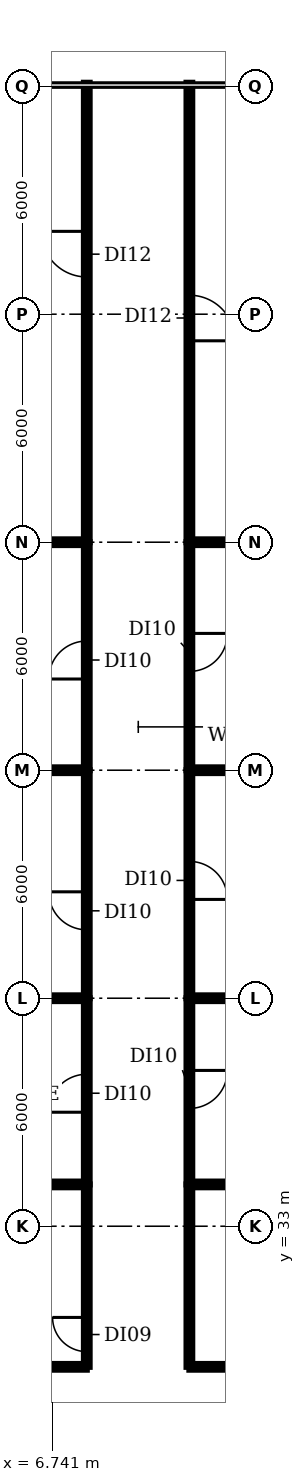
"""IFC4 building model, lengths in metres.
Left out: names, types, materials, properties, quantities, classifications, styles, units other than length and angle.
Written with IfcOpenShell. Run it as: python <this file> out.ifc"""

import sys

from ifc_helpers import new_model, si_unit, direction, frame, frame_2d, origin, place, context, subcontext, project, spatial, rectangle, extrude, element, fill, save


model = new_model("IFC4")
c1 = context("Model", 3, precision=1e-05, world=origin(), true_north=direction((0.0, 1.0)))
c2 = subcontext(c1, "Body", "Model", "MODEL_VIEW")
j1 = project(units=[si_unit("LENGTHUNIT", "METRE"), si_unit("PLANEANGLEUNIT", "RADIAN")], contexts=[c1])
p1 = place(None, origin())
s1 = spatial("IfcSite", under=j1, at=p1, CompositionType="ELEMENT")
p2 = place(p1, origin())
s2 = spatial("IfcBuilding", under=s1, at=p2, CompositionType="ELEMENT")
p3 = place(p2, frame((0.0, 0.0, 167.6)))
s3 = spatial("IfcBuildingStorey", under=s2, at=p3, CompositionType="ELEMENT", Elevation=167.6)
for number, where, z_axis, x_axis in (
    (1, (-0.98, 34.1, 0.0), (0.0, 0.0, 1.0), (1.0, 0.0, 0.0)),
    (2, (-0.98, 39.0, 0.0), (0.0, 0.0, 1.0), (1.0, 0.0, 0.0)),
    (3, (-0.98, 45.0, 0.0), (0.0, 0.0, 1.0), (1.0, 0.0, 0.0)),
):
    element("IfcWall", number, at=place(p3, frame(where, z_axis=z_axis, x_axis=x_axis)), inside=s3, PredefinedType="PARTITIONING", context=c2, shape_type="SweptSolid", body=[
        extrude(rectangle(XDim=8.63, YDim=0.15, at=frame_2d((4.315, 0.0))), origin(), (0.0, 0.0, 1.0), 2.88),
    ])
p4 = place(p3, frame((-0.965, 51.0, 0.0), z_axis=(0.0, 0.0, 1.0), x_axis=(1.0, 0.0, 0.0)))
e4 = element("IfcWall", 4, at=p4, inside=s3, PredefinedType="PARTITIONING", context=c2, shape_type="SweptSolid", body=[
    extrude(rectangle(XDim=8.615, YDim=0.15, at=frame_2d((4.308, 0.0))), origin(), (0.0, 0.0, 1.0), 2.88),
])
p5 = place(p3, frame((2.7, 29.3, 0.0), z_axis=(0.0, 0.0, 1.0), x_axis=(1.0, 0.0, 0.0)))
e5 = element("IfcWall", 5, at=p5, inside=s3, PredefinedType="PARTITIONING", context=c2, shape_type="SweptSolid", body=[
    extrude(rectangle(XDim=4.95, YDim=0.15, at=frame_2d((2.475, 0.0))), origin(), (0.0, 0.0, 1.0), 2.88),
])
p6 = place(p3, frame((7.65, 29.3, 0.0), z_axis=(0.0, 0.0, 1.0), x_axis=(0.0, 1.0, 0.0)))
e6 = element("IfcWall", 6, at=p6, inside=s3, PredefinedType="PARTITIONING", context=c2, shape_type="SweptSolid", body=[
    extrude(rectangle(XDim=4.8, YDim=0.15, at=frame_2d((2.4, 0.0))), origin(), (0.0, 0.0, 1.0), 2.88),
])
p7 = place(p6, frame((0.4, 0.0, 0.0)))
e7 = element("IfcOpeningElement", 7, at=p7, cuts=e6, PredefinedType="OPENING", context=c2, shape_type="SweptSolid", body=[
    extrude(rectangle(XDim=0.9, YDim=2.1, at=frame_2d((0.45, 1.05))), frame((0.0, 0.085, 0.0), z_axis=(0.0, -1.0, 0.0), x_axis=(1.0, 0.0, 0.0)), (0.0, 0.0, 1.0), 0.17),
])
p8 = place(p3, frame((7.65, 34.1, 0.0), z_axis=(0.0, 0.0, 1.0), x_axis=(0.0, 1.0, 0.0)))
e8 = element("IfcWall", 8, at=p8, inside=s3, PredefinedType="PARTITIONING", context=c2, shape_type="SweptSolid", body=[
    extrude(rectangle(XDim=4.9, YDim=0.15, at=frame_2d((2.45, 0.0))), origin(), (0.0, 0.0, 1.0), 2.88),
])
p9 = place(p8, frame((1.9, 0.0, 0.0)))
e9 = element("IfcOpeningElement", 9, at=p9, cuts=e8, PredefinedType="OPENING", context=c2, shape_type="SweptSolid", body=[
    extrude(rectangle(XDim=1.0, YDim=2.1, at=frame_2d((0.5, 1.05))), frame((0.0, 0.085, 0.0), z_axis=(0.0, -1.0, 0.0), x_axis=(1.0, 0.0, 0.0)), (0.0, 0.0, 1.0), 0.17),
])
p10 = place(p3, frame((7.65, 39.0, 0.0), z_axis=(0.0, 0.0, 1.0), x_axis=(0.0, 1.0, 0.0)))
e10 = element("IfcWall", 10, at=p10, inside=s3, PredefinedType="PARTITIONING", context=c2, shape_type="SweptSolid", body=[
    extrude(rectangle(XDim=6.0, YDim=0.15, at=frame_2d((3.0, 0.0))), origin(), (0.0, 0.0, 1.0), 2.88),
])
p11 = place(p10, frame((1.8, 0.0, 0.0)))
e11 = element("IfcOpeningElement", 11, at=p11, cuts=e10, PredefinedType="OPENING", context=c2, shape_type="SweptSolid", body=[
    extrude(rectangle(XDim=1.0, YDim=2.1, at=frame_2d((0.5, 1.05))), frame((0.0, 0.085, 0.0), z_axis=(0.0, -1.0, 0.0), x_axis=(1.0, 0.0, 0.0)), (0.0, 0.0, 1.0), 0.17),
])
p12 = place(p3, frame((7.65, 45.0, 0.0), z_axis=(0.0, 0.0, 1.0), x_axis=(0.0, 1.0, 0.0)))
e12 = element("IfcWall", 12, at=p12, inside=s3, PredefinedType="PARTITIONING", context=c2, shape_type="SweptSolid", body=[
    extrude(rectangle(XDim=6.0, YDim=0.15, at=frame_2d((3.0, 0.0))), origin(), (0.0, 0.0, 1.0), 2.88),
])
p13 = place(p12, frame((2.4, 0.0, 0.0)))
e13 = element("IfcOpeningElement", 13, at=p13, cuts=e12, PredefinedType="OPENING", context=c2, shape_type="SweptSolid", body=[
    extrude(rectangle(XDim=1.0, YDim=2.1, at=frame_2d((0.5, 1.05))), frame((0.0, 0.085, 0.0), z_axis=(0.0, -1.0, 0.0), x_axis=(1.0, 0.0, 0.0)), (0.0, 0.0, 1.0), 0.17),
])
p14 = place(p3, frame((7.65, 51.0, 0.0), z_axis=(0.0, 0.0, 1.0), x_axis=(0.0, 1.0, 0.0)))
e14 = element("IfcWall", 14, at=p14, inside=s3, PredefinedType="PARTITIONING", context=c2, shape_type="SweptSolid", body=[
    extrude(rectangle(XDim=12.09, YDim=0.15, at=frame_2d((6.045, 0.0))), origin(), (0.0, 0.0, 1.0), 2.88),
])
p15 = place(p14, frame((6.98, 0.0, 0.0)))
e15 = element("IfcOpeningElement", 15, at=p15, cuts=e14, PredefinedType="OPENING", context=c2, shape_type="SweptSolid", body=[
    extrude(rectangle(XDim=1.2, YDim=2.1, at=frame_2d((0.6, 1.05))), frame((0.0, 0.085, 0.0), z_axis=(0.0, -1.0, 0.0), x_axis=(1.0, 0.0, 0.0)), (0.0, 0.0, 1.0), 0.17),
])
p16 = place(p3, frame((10.35, 29.3, 0.0), z_axis=(0.0, 0.0, 1.0), x_axis=(0.0, 1.0, 0.0)))
e16 = element("IfcWall", 16, at=p16, inside=s3, PredefinedType="PARTITIONING", context=c2, shape_type="SweptSolid", body=[
    extrude(rectangle(XDim=4.8, YDim=0.15, at=frame_2d((2.4, 0.0))), origin(), (0.0, 0.0, 1.0), 2.88),
])
p17 = place(p3, frame((10.35, 29.3, 0.0), z_axis=(0.0, 0.0, 1.0), x_axis=(1.0, 0.0, 0.0)))
e17 = element("IfcWall", 17, at=p17, inside=s3, PredefinedType="PARTITIONING", context=c2, shape_type="SweptSolid", body=[
    extrude(rectangle(XDim=4.05, YDim=0.15, at=frame_2d((2.025, 0.0))), origin(), (0.0, 0.0, 1.0), 2.88),
])
p18 = place(p3, frame((10.35, 34.1, 0.0), z_axis=(0.0, 0.0, 1.0), x_axis=(1.0, 0.0, 0.0)))
e18 = element("IfcWall", 18, at=p18, inside=s3, PredefinedType="PARTITIONING", context=c2, shape_type="SweptSolid", body=[
    extrude(rectangle(XDim=11.1, YDim=0.15, at=frame_2d((5.55, 0.0))), origin(), (0.0, 0.0, 1.0), 2.88),
])
p19 = place(p3, frame((10.35, 39.0, 0.0), z_axis=(0.0, 0.0, 1.0), x_axis=(0.0, -1.0, 0.0)))
e19 = element("IfcWall", 19, at=p19, inside=s3, PredefinedType="PARTITIONING", context=c2, shape_type="SweptSolid", body=[
    extrude(rectangle(XDim=4.9, YDim=0.15, at=frame_2d((2.45, 0.0))), origin(), (0.0, 0.0, 1.0), 2.88),
])
p20 = place(p19, frame((1.9, 0.0, 0.0)))
e20 = element("IfcOpeningElement", 20, at=p20, cuts=e19, PredefinedType="OPENING", context=c2, shape_type="SweptSolid", body=[
    extrude(rectangle(XDim=1.0, YDim=2.1, at=frame_2d((0.5, 1.05))), frame((0.0, 0.085, 0.0), z_axis=(0.0, -1.0, 0.0), x_axis=(1.0, 0.0, 0.0)), (0.0, 0.0, 1.0), 0.17),
])
p21 = place(p3, frame((10.35, 39.0, 0.0), z_axis=(0.0, 0.0, 1.0), x_axis=(1.0, 0.0, 0.0)))
e21 = element("IfcWall", 21, at=p21, inside=s3, PredefinedType="PARTITIONING", context=c2, shape_type="SweptSolid", body=[
    extrude(rectangle(XDim=14.74, YDim=0.15, at=frame_2d((7.37, 0.0))), origin(), (0.0, 0.0, 1.0), 2.88),
])
p22 = place(p3, frame((10.35, 45.0, 0.0), z_axis=(0.0, 0.0, 1.0), x_axis=(0.0, -1.0, 0.0)))
e22 = element("IfcWall", 22, at=p22, inside=s3, PredefinedType="PARTITIONING", context=c2, shape_type="SweptSolid", body=[
    extrude(rectangle(XDim=6.0, YDim=0.15, at=frame_2d((3.0, 0.0))), origin(), (0.0, 0.0, 1.0), 2.88),
])
p23 = place(p22, frame((2.4, 0.0, 0.0)))
e23 = element("IfcOpeningElement", 23, at=p23, cuts=e22, PredefinedType="OPENING", context=c2, shape_type="SweptSolid", body=[
    extrude(rectangle(XDim=1.0, YDim=2.1, at=frame_2d((0.5, 1.05))), frame((0.0, 0.085, 0.0), z_axis=(0.0, -1.0, 0.0), x_axis=(1.0, 0.0, 0.0)), (0.0, 0.0, 1.0), 0.17),
])
p24 = place(p3, frame((10.35, 45.0, 0.0), z_axis=(0.0, 0.0, 1.0), x_axis=(1.0, 0.0, 0.0)))
e24 = element("IfcWall", 24, at=p24, inside=s3, PredefinedType="PARTITIONING", context=c2, shape_type="SweptSolid", body=[
    extrude(rectangle(XDim=14.79, YDim=0.15, at=frame_2d((7.395, 0.0))), origin(), (0.0, 0.0, 1.0), 2.88),
])
p25 = place(p3, frame((10.35, 51.0, 0.0), z_axis=(0.0, 0.0, 1.0), x_axis=(0.0, -1.0, 0.0)))
e25 = element("IfcWall", 25, at=p25, inside=s3, PredefinedType="PARTITIONING", context=c2, shape_type="SweptSolid", body=[
    extrude(rectangle(XDim=6.0, YDim=0.15, at=frame_2d((3.0, 0.0))), origin(), (0.0, 0.0, 1.0), 2.88),
])
p26 = place(p25, frame((2.4, 0.0, 0.0)))
e26 = element("IfcOpeningElement", 26, at=p26, cuts=e25, PredefinedType="OPENING", context=c2, shape_type="SweptSolid", body=[
    extrude(rectangle(XDim=1.0, YDim=2.1, at=frame_2d((0.5, 1.05))), frame((0.0, 0.085, 0.0), z_axis=(0.0, -1.0, 0.0), x_axis=(1.0, 0.0, 0.0)), (0.0, 0.0, 1.0), 0.17),
])
p27 = place(p3, frame((10.35, 51.0, 0.0), z_axis=(0.0, 0.0, 1.0), x_axis=(1.0, 0.0, 0.0)))
e27 = element("IfcWall", 27, at=p27, inside=s3, PredefinedType="PARTITIONING", context=c2, shape_type="SweptSolid", body=[
    extrude(rectangle(XDim=14.84, YDim=0.15, at=frame_2d((7.42, 0.0))), origin(), (0.0, 0.0, 1.0), 2.88),
])
p28 = place(p3, frame((10.35, 63.09, 0.0), z_axis=(0.0, 0.0, 1.0), x_axis=(0.0, -1.0, 0.0)))
e28 = element("IfcWall", 28, at=p28, inside=s3, PredefinedType="PARTITIONING", context=c2, shape_type="SweptSolid", body=[
    extrude(rectangle(XDim=12.09, YDim=0.15, at=frame_2d((6.045, 0.0))), origin(), (0.0, 0.0, 1.0), 2.88),
])
p29 = place(p28, frame((5.59, 0.0, 0.0)))
e29 = element("IfcOpeningElement", 29, at=p29, cuts=e28, PredefinedType="OPENING", context=c2, shape_type="SweptSolid", body=[
    extrude(rectangle(XDim=1.2, YDim=2.1, at=frame_2d((0.6, 1.05))), frame((0.0, 0.085, 0.0), z_axis=(0.0, -1.0, 0.0), x_axis=(1.0, 0.0, 0.0)), (0.0, 0.0, 1.0), 0.17),
])
p30 = place(p7, origin())
e30 = element("IfcDoor", 30, at=p30, inside=s3, OperationType="SINGLE_SWING_RIGHT", PredefinedType="DOOR", context=c2, shape_type="SweptSolid", body=[
    extrude(rectangle(XDim=0.9, YDim=2.1, at=frame_2d((0.45, 1.05))), frame((0.0, 0.025, 0.0), z_axis=(0.0, -1.0, 0.0), x_axis=(1.0, 0.0, 0.0)), (0.0, 0.0, 1.0), 0.05),
])
fill(e7, e30)
p31 = place(p9, origin())
e31 = element("IfcDoor", 31, at=p31, inside=s3, OperationType="SINGLE_SWING_LEFT", PredefinedType="DOOR", context=c2, shape_type="SweptSolid", body=[
    extrude(rectangle(XDim=1.0, YDim=2.1, at=frame_2d((0.5, 1.05))), frame((0.0, 0.025, 0.0), z_axis=(0.0, -1.0, 0.0), x_axis=(1.0, 0.0, 0.0)), (0.0, 0.0, 1.0), 0.05),
])
fill(e9, e31)
p32 = place(p11, origin())
e32 = element("IfcDoor", 32, at=p32, inside=s3, OperationType="SINGLE_SWING_RIGHT", PredefinedType="DOOR", context=c2, shape_type="SweptSolid", body=[
    extrude(rectangle(XDim=1.0, YDim=2.1, at=frame_2d((0.5, 1.05))), frame((0.0, 0.025, 0.0), z_axis=(0.0, -1.0, 0.0), x_axis=(1.0, 0.0, 0.0)), (0.0, 0.0, 1.0), 0.05),
])
fill(e11, e32)
p33 = place(p13, origin())
e33 = element("IfcDoor", 33, at=p33, inside=s3, OperationType="SINGLE_SWING_LEFT", PredefinedType="DOOR", context=c2, shape_type="SweptSolid", body=[
    extrude(rectangle(XDim=1.0, YDim=2.1, at=frame_2d((0.5, 1.05))), frame((0.0, 0.025, 0.0), z_axis=(0.0, -1.0, 0.0), x_axis=(1.0, 0.0, 0.0)), (0.0, 0.0, 1.0), 0.05),
])
fill(e13, e33)
p34 = place(p15, origin())
e34 = element("IfcDoor", 34, at=p34, inside=s3, OperationType="SINGLE_SWING_RIGHT", PredefinedType="DOOR", context=c2, shape_type="SweptSolid", body=[
    extrude(rectangle(XDim=1.2, YDim=2.1, at=frame_2d((0.6, 1.05))), frame((0.0, 0.025, 0.0), z_axis=(0.0, -1.0, 0.0), x_axis=(1.0, 0.0, 0.0)), (0.0, 0.0, 1.0), 0.05),
])
fill(e15, e34)
p35 = place(p20, origin())
e35 = element("IfcDoor", 35, at=p35, inside=s3, OperationType="SINGLE_SWING_LEFT", PredefinedType="DOOR", context=c2, shape_type="SweptSolid", body=[
    extrude(rectangle(XDim=1.0, YDim=2.1, at=frame_2d((0.5, 1.05))), frame((0.0, 0.025, 0.0), z_axis=(0.0, -1.0, 0.0), x_axis=(1.0, 0.0, 0.0)), (0.0, 0.0, 1.0), 0.05),
])
fill(e20, e35)
p36 = place(p23, origin())
e36 = element("IfcDoor", 36, at=p36, inside=s3, OperationType="SINGLE_SWING_RIGHT", PredefinedType="DOOR", context=c2, shape_type="SweptSolid", body=[
    extrude(rectangle(XDim=1.0, YDim=2.1, at=frame_2d((0.5, 1.05))), frame((0.0, 0.025, 0.0), z_axis=(0.0, -1.0, 0.0), x_axis=(1.0, 0.0, 0.0)), (0.0, 0.0, 1.0), 0.05),
])
fill(e23, e36)
p37 = place(p26, origin())
e37 = element("IfcDoor", 37, at=p37, inside=s3, OperationType="SINGLE_SWING_LEFT", PredefinedType="DOOR", context=c2, shape_type="SweptSolid", body=[
    extrude(rectangle(XDim=1.0, YDim=2.1, at=frame_2d((0.5, 1.05))), frame((0.0, 0.025, 0.0), z_axis=(0.0, -1.0, 0.0), x_axis=(1.0, 0.0, 0.0)), (0.0, 0.0, 1.0), 0.05),
])
fill(e26, e37)
p38 = place(p29, origin())
e38 = element("IfcDoor", 38, at=p38, inside=s3, OperationType="SINGLE_SWING_RIGHT", PredefinedType="DOOR", context=c2, shape_type="SweptSolid", body=[
    extrude(rectangle(XDim=1.2, YDim=2.1, at=frame_2d((0.6, 1.05))), frame((0.0, 0.025, 0.0), z_axis=(0.0, -1.0, 0.0), x_axis=(1.0, 0.0, 0.0)), (0.0, 0.0, 1.0), 0.05),
])
fill(e29, e38)
save(model, sys.argv[1])
